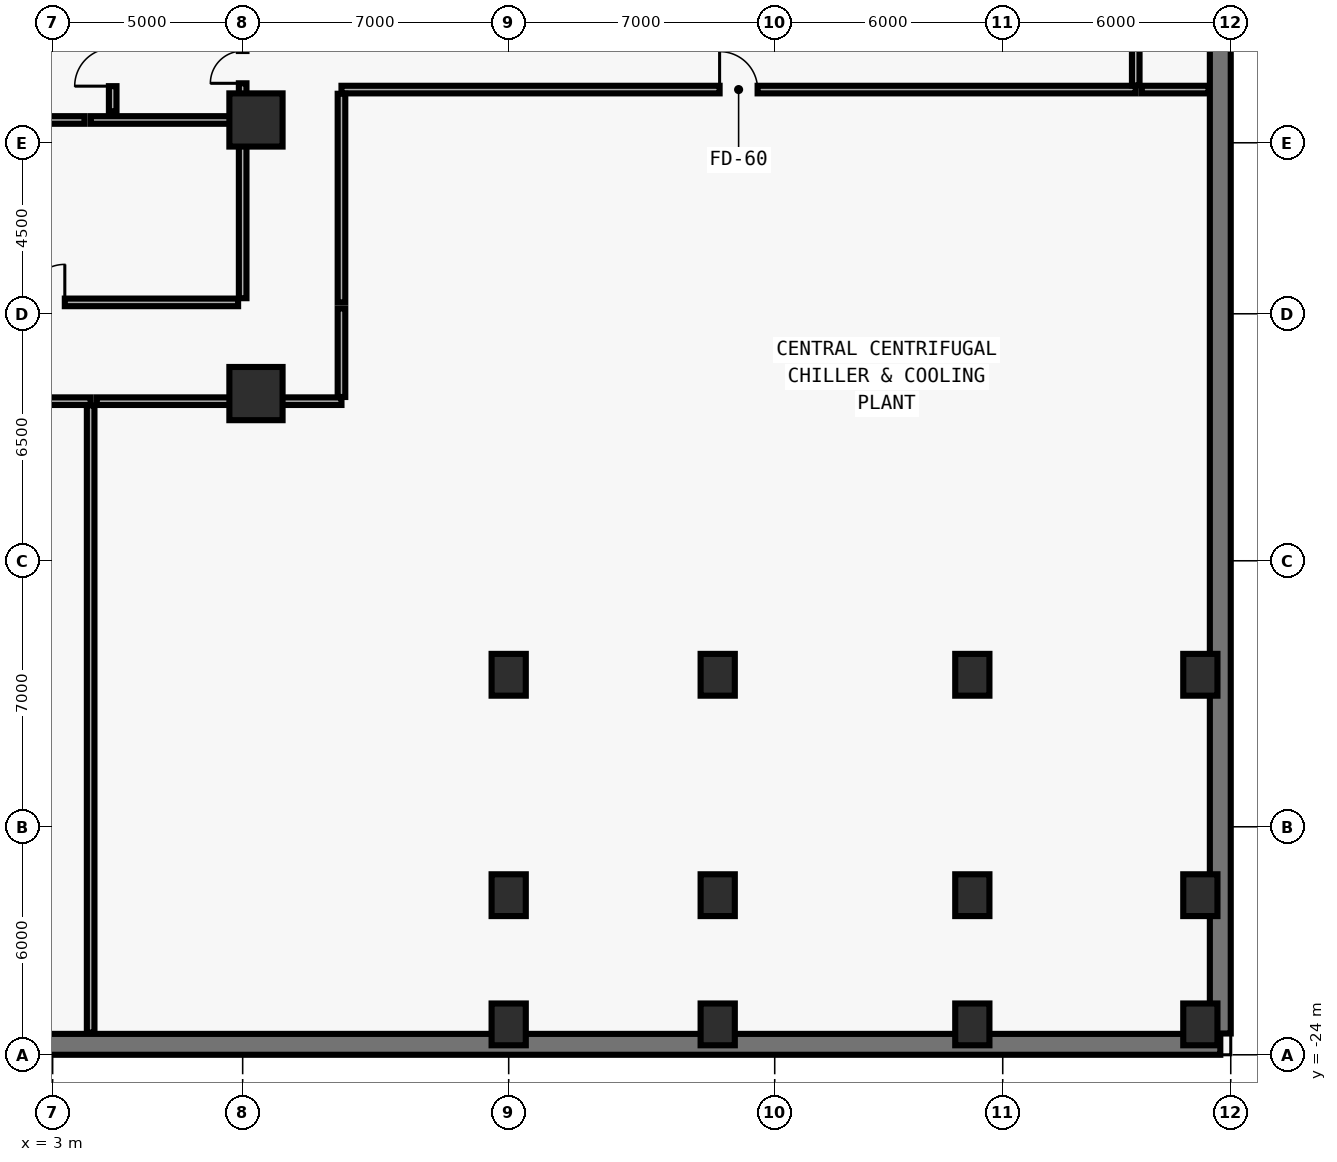
"""IFC4 building model, lengths in metres.
Left out: names, types, materials, properties, quantities, classifications, styles, units other than length and angle.
Written with IfcOpenShell. Run it as: python <this file> out.ifc"""

import sys

from ifc_helpers import new_model, si_unit, direction, frame, frame_2d, origin, origin_2d, place, context, subcontext, project, spatial, rectangle, extrude, element, fill, save


model = new_model("IFC4")
c1 = context("Model", 3, precision=1e-05, world=origin(), true_north=direction((0.0, 1.0)))
c2 = subcontext(c1, "Body", "Model", "MODEL_VIEW")
j1 = project(units=[si_unit("LENGTHUNIT", "METRE"), si_unit("PLANEANGLEUNIT", "RADIAN")], contexts=[c1])
p1 = place(None, origin())
s1 = spatial("IfcSite", under=j1, at=p1, CompositionType="ELEMENT")
p2 = place(p1, origin())
s2 = spatial("IfcBuilding", under=s1, at=p2, CompositionType="ELEMENT")
p3 = place(p2, frame((0.0, 0.0, -13.5)))
s3 = spatial("IfcBuildingStorey", under=s2, at=p3, CompositionType="ELEMENT", Elevation=-13.5)
p4 = place(p3, frame((-33.725, -23.725, 0.0), z_axis=(0.0, 0.0, 1.0), x_axis=(1.0, 0.0, 0.0)))
e1 = element("IfcWall", 1, at=p4, inside=s3, PredefinedType="SOLIDWALL", context=c2, shape_type="SweptSolid", body=[
    extrude(rectangle(XDim=67.45, YDim=0.55, at=frame_2d((33.725, 0.0))), origin(), (0.0, 0.0, 1.0), 4.492),
])
p5 = place(p3, frame((33.725, -23.44, 0.0), z_axis=(0.0, 0.0, 1.0), x_axis=(0.0, 1.0, 0.0)))
e2 = element("IfcWall", 2, at=p5, inside=s3, PredefinedType="SOLIDWALL", context=c2, shape_type="SweptSolid", body=[
    extrude(rectangle(XDim=46.88, YDim=0.55, at=frame_2d((23.44, 0.0))), origin(), (0.0, 0.0, 1.0), 4.492),
])
for number, where, z_axis, x_axis in (
    (3, (8.35, 0.6, 0.0), (0.0, 0.0, 1.0), (1.0, 0.0, 0.0)),
    (4, (8.35, -6.6, 0.0), (0.0, 0.0, 1.0), (1.0, 0.0, 0.0)),
):
    element("IfcColumn", number, at=place(p3, frame(where, z_axis=z_axis, x_axis=x_axis)), inside=s3, PredefinedType="COLUMN", context=c2, shape_type="SweptSolid", body=[
        extrude(rectangle(XDim=1.4, YDim=1.4, at=origin_2d()), origin(), (0.0, 0.0, 1.0), 4.475),
    ])
for number, where, z_axis, x_axis in (
    (5, (15.0, -23.2, 0.0), (0.0, 0.0, 1.0), (1.0, 0.0, 0.0)),
    (6, (15.0, -19.8, 0.0), (0.0, 0.0, 1.0), (1.0, 0.0, 0.0)),
    (7, (15.0, -14.0, 0.0), (0.0, 0.0, 1.0), (1.0, 0.0, 0.0)),
    (8, (20.5, -23.2, 0.0), (0.0, 0.0, 1.0), (1.0, 0.0, 0.0)),
    (9, (20.5, -19.8, 0.0), (0.0, 0.0, 1.0), (1.0, 0.0, 0.0)),
    (10, (20.5, -14.0, 0.0), (0.0, 0.0, 1.0), (1.0, 0.0, 0.0)),
    (11, (27.2, -23.2, 0.0), (0.0, 0.0, 1.0), (1.0, 0.0, 0.0)),
    (12, (27.2, -19.8, 0.0), (0.0, 0.0, 1.0), (1.0, 0.0, 0.0)),
    (13, (27.2, -14.0, 0.0), (0.0, 0.0, 1.0), (1.0, 0.0, 0.0)),
    (14, (33.2, -23.2, 0.0), (0.0, 0.0, 1.0), (1.0, 0.0, 0.0)),
    (15, (33.2, -19.8, 0.0), (0.0, 0.0, 1.0), (1.0, 0.0, 0.0)),
    (16, (33.2, -14.0, 0.0), (0.0, 0.0, 1.0), (1.0, 0.0, 0.0)),
):
    element("IfcColumn", number, at=place(p3, frame(where, z_axis=z_axis, x_axis=x_axis)), inside=s3, PredefinedType="COLUMN", context=c2, shape_type="SweptSolid", body=[
        extrude(rectangle(XDim=0.9, YDim=1.1, at=origin_2d()), origin(), (0.0, 0.0, 1.0), 4.475),
    ])
p6 = place(p3, frame((4.0, 0.6, 0.0), z_axis=(0.0, 0.0, 1.0), x_axis=(1.0, 0.0, 0.0)))
e17 = element("IfcWall", 17, at=p6, inside=s3, PredefinedType="SOLIDWALL", context=c2, shape_type="SweptSolid", body=[
    extrude(rectangle(XDim=3.88, YDim=0.2, at=frame_2d((1.94, 0.0))), origin(), (0.0, 0.0, 1.0), 3.362),
])
p7 = place(p3, frame((4.58, 0.83, 0.0), z_axis=(0.0, 0.0, 1.0), x_axis=(0.0, 1.0, 0.0)))
e18 = element("IfcWall", 18, at=p7, inside=s3, PredefinedType="MOVABLE", context=c2, shape_type="SweptSolid", body=[
    extrude(rectangle(XDim=2.14, YDim=0.2, at=frame_2d((1.07, 0.0))), origin(), (0.0, 0.0, 1.0), 4.18),
])
p8 = place(p7, frame((0.66, 0.0, 0.0)))
e19 = element("IfcOpeningElement", 19, at=p8, cuts=e18, PredefinedType="OPENING", context=c2, shape_type="SweptSolid", body=[
    extrude(rectangle(XDim=1.0, YDim=2.1, at=frame_2d((0.5, 1.05))), frame((0.0, 0.11, 0.0), z_axis=(0.0, -1.0, 0.0), x_axis=(1.0, 0.0, 0.0)), (0.0, 0.0, 1.0), 0.22),
])
p9 = place(p3, frame((8.0, 0.72, 0.0), z_axis=(0.0, 0.0, 1.0), x_axis=(0.0, 1.0, 0.0)))
e20 = element("IfcWall", 20, at=p9, inside=s3, PredefinedType="MOVABLE", context=c2, shape_type="SweptSolid", body=[
    extrude(rectangle(XDim=2.25, YDim=0.2, at=frame_2d((1.125, 0.0))), origin(), (0.0, 0.0, 1.0), 3.262),
])
p10 = place(p9, frame((0.845, 0.0, 0.0)))
e21 = element("IfcOpeningElement", 21, at=p10, cuts=e20, PredefinedType="OPENING", context=c2, shape_type="SweptSolid", body=[
    extrude(rectangle(XDim=0.85, YDim=2.1, at=frame_2d((0.425, 1.05))), frame((0.0, 0.11, 0.0), z_axis=(0.0, -1.0, 0.0), x_axis=(1.0, 0.0, 0.0)), (0.0, 0.0, 1.0), 0.22),
])
p11 = place(p3, frame((-1.88, -4.2, 0.0), z_axis=(0.0, 0.0, 1.0), x_axis=(1.0, 0.0, 0.0)))
e22 = element("IfcWall", 22, at=p11, inside=s3, PredefinedType="MOVABLE", context=c2, shape_type="SweptSolid", body=[
    extrude(rectangle(XDim=9.76, YDim=0.2, at=frame_2d((4.88, 0.0))), origin(), (0.0, 0.0, 1.0), 4.18),
])
p12 = place(p11, frame((4.2, 0.0, 0.0)))
e23 = element("IfcOpeningElement", 23, at=p12, cuts=e22, PredefinedType="OPENING", context=c2, shape_type="SweptSolid", body=[
    extrude(rectangle(XDim=1.0, YDim=2.1, at=frame_2d((0.5, 1.05))), frame((0.0, 0.11, 0.0), z_axis=(0.0, -1.0, 0.0), x_axis=(1.0, 0.0, 0.0)), (0.0, 0.0, 1.0), 0.22),
])
p13 = place(p3, frame((10.6, 1.4, 0.0), z_axis=(0.0, 0.0, 1.0), x_axis=(1.0, 0.0, 0.0)))
e24 = element("IfcWall", 24, at=p13, inside=s3, PredefinedType="MOVABLE", context=c2, shape_type="SweptSolid", body=[
    extrude(rectangle(XDim=20.9, YDim=0.2, at=frame_2d((10.45, 0.0))), origin(), (0.0, 0.0, 1.0), 4.18),
])
p14 = place(p13, frame((9.95, 0.0, 0.0)))
e25 = element("IfcOpeningElement", 25, at=p14, cuts=e24, PredefinedType="OPENING", context=c2, shape_type="SweptSolid", body=[
    extrude(rectangle(XDim=1.0, YDim=2.1, at=frame_2d((0.5, 1.05))), frame((0.0, 0.11, 0.0), z_axis=(0.0, -1.0, 0.0), x_axis=(1.0, 0.0, 0.0)), (0.0, 0.0, 1.0), 0.22),
])
p15 = place(p3, frame((-1.88, 0.6, 0.0), z_axis=(0.0, 0.0, 1.0), x_axis=(1.0, 0.0, 0.0)))
e26 = element("IfcWall", 26, at=p15, inside=s3, PredefinedType="MOVABLE", context=c2, shape_type="SweptSolid", body=[
    extrude(rectangle(XDim=5.72, YDim=0.2, at=frame_2d((2.86, 0.0))), origin(), (0.0, 0.0, 1.0), 3.362),
])
p16 = place(p3, frame((8.0, -4.09, 0.0), z_axis=(0.0, 0.0, 1.0), x_axis=(0.0, 1.0, 0.0)))
e27 = element("IfcWall", 27, at=p16, inside=s3, PredefinedType="MOVABLE", context=c2, shape_type="SweptSolid", body=[
    extrude(rectangle(XDim=4.59, YDim=0.2, at=frame_2d((2.295, 0.0))), origin(), (0.0, 0.0, 1.0), 3.362),
])
p17 = place(p3, frame((-2.0, -6.8, 0.0), z_axis=(0.0, 0.0, 1.0), x_axis=(1.0, 0.0, 0.0)))
e28 = element("IfcWall", 28, at=p17, inside=s3, PredefinedType="MOVABLE", context=c2, shape_type="SweptSolid", body=[
    extrude(rectangle(XDim=6.0, YDim=0.2, at=frame_2d((3.0, 0.0))), origin(), (0.0, 0.0, 1.0), 3.362),
])
p18 = place(p3, frame((10.6, -4.2, 0.0), z_axis=(0.0, 0.0, 1.0), x_axis=(0.0, 1.0, 0.0)))
e29 = element("IfcWall", 29, at=p18, inside=s3, PredefinedType="MOVABLE", context=c2, shape_type="SweptSolid", body=[
    extrude(rectangle(XDim=5.49, YDim=0.2, at=frame_2d((2.745, 0.0))), origin(), (0.0, 0.0, 1.0), 4.18),
])
p19 = place(p3, frame((4.16, -6.8, 0.0), z_axis=(0.0, 0.0, 1.0), x_axis=(1.0, 0.0, 0.0)))
e30 = element("IfcWall", 30, at=p19, inside=s3, PredefinedType="MOVABLE", context=c2, shape_type="SweptSolid", body=[
    extrude(rectangle(XDim=3.84, YDim=0.2, at=frame_2d((1.92, 0.0))), origin(), (0.0, 0.0, 1.0), 3.362),
])
p20 = place(p3, frame((8.16, -6.8, 0.0), z_axis=(0.0, 0.0, 1.0), x_axis=(1.0, 0.0, 0.0)))
e31 = element("IfcWall", 31, at=p20, inside=s3, PredefinedType="MOVABLE", context=c2, shape_type="SweptSolid", body=[
    extrude(rectangle(XDim=2.44, YDim=0.2, at=frame_2d((1.22, 0.0))), origin(), (0.0, 0.0, 1.0), 4.18),
])
p21 = place(p3, frame((10.6, -6.69, 0.0), z_axis=(0.0, 0.0, 1.0), x_axis=(0.0, 1.0, 0.0)))
e32 = element("IfcWall", 32, at=p21, inside=s3, PredefinedType="MOVABLE", context=c2, shape_type="SweptSolid", body=[
    extrude(rectangle(XDim=2.33, YDim=0.2, at=frame_2d((1.165, 0.0))), origin(), (0.0, 0.0, 1.0), 4.18),
])
p22 = place(p3, frame((31.5, 1.51, 0.0), z_axis=(0.0, 0.0, 1.0), x_axis=(0.0, 1.0, 0.0)))
e33 = element("IfcWall", 33, at=p22, inside=s3, PredefinedType="MOVABLE", context=c2, shape_type="SweptSolid", body=[
    extrude(rectangle(XDim=2.18, YDim=0.2, at=frame_2d((1.09, 0.0))), origin(), (0.0, 0.0, 1.0), 4.18),
])
p23 = place(p3, frame((4.0, -6.91, 0.0), z_axis=(0.0, 0.0, 1.0), x_axis=(0.0, -1.0, 0.0)))
e34 = element("IfcWall", 34, at=p23, inside=s3, PredefinedType="MOVABLE", context=c2, shape_type="SweptSolid", body=[
    extrude(rectangle(XDim=16.505, YDim=0.2, at=frame_2d((8.252, 0.0))), origin(), (0.0, 0.0, 1.0), 4.18),
])
p24 = place(p3, frame((31.66, 1.4, 0.0), z_axis=(0.0, 0.0, 1.0), x_axis=(1.0, 0.0, 0.0)))
e35 = element("IfcWall", 35, at=p24, inside=s3, PredefinedType="MOVABLE", context=c2, shape_type="SweptSolid", body=[
    extrude(rectangle(XDim=1.755, YDim=0.2, at=frame_2d((0.877, 0.0))), origin(), (0.0, 0.0, 1.0), 4.18),
])
p25 = place(p8, origin())
e36 = element("IfcDoor", 36, at=p25, inside=s3, OperationType="SINGLE_SWING_LEFT", PredefinedType="DOOR", context=c2, shape_type="SweptSolid", body=[
    extrude(rectangle(XDim=1.0, YDim=2.1, at=frame_2d((0.5, 1.05))), frame((0.0, 0.025, 0.0), z_axis=(0.0, -1.0, 0.0), x_axis=(1.0, 0.0, 0.0)), (0.0, 0.0, 1.0), 0.05),
])
fill(e19, e36)
p26 = place(p10, origin())
e37 = element("IfcDoor", 37, at=p26, inside=s3, OperationType="SINGLE_SWING_LEFT", PredefinedType="DOOR", context=c2, shape_type="SweptSolid", body=[
    extrude(rectangle(XDim=0.85, YDim=2.1, at=frame_2d((0.425, 1.05))), frame((0.0, 0.025, 0.0), z_axis=(0.0, -1.0, 0.0), x_axis=(1.0, 0.0, 0.0)), (0.0, 0.0, 1.0), 0.05),
])
fill(e21, e37)
p27 = place(p12, origin())
e38 = element("IfcDoor", 38, at=p27, inside=s3, OperationType="SINGLE_SWING_RIGHT", PredefinedType="DOOR", context=c2, shape_type="SweptSolid", body=[
    extrude(rectangle(XDim=1.0, YDim=2.1, at=frame_2d((0.5, 1.05))), frame((0.0, 0.025, 0.0), z_axis=(0.0, -1.0, 0.0), x_axis=(1.0, 0.0, 0.0)), (0.0, 0.0, 1.0), 0.05),
])
fill(e23, e38)
p28 = place(p14, origin())
e39 = element("IfcDoor", 39, at=p28, inside=s3, OperationType="SINGLE_SWING_LEFT", PredefinedType="DOOR", context=c2, shape_type="SweptSolid", body=[
    extrude(rectangle(XDim=1.0, YDim=2.1, at=frame_2d((0.5, 1.05))), frame((0.0, 0.025, 0.0), z_axis=(0.0, -1.0, 0.0), x_axis=(1.0, 0.0, 0.0)), (0.0, 0.0, 1.0), 0.05),
])
fill(e25, e39)
save(model, sys.argv[1])
